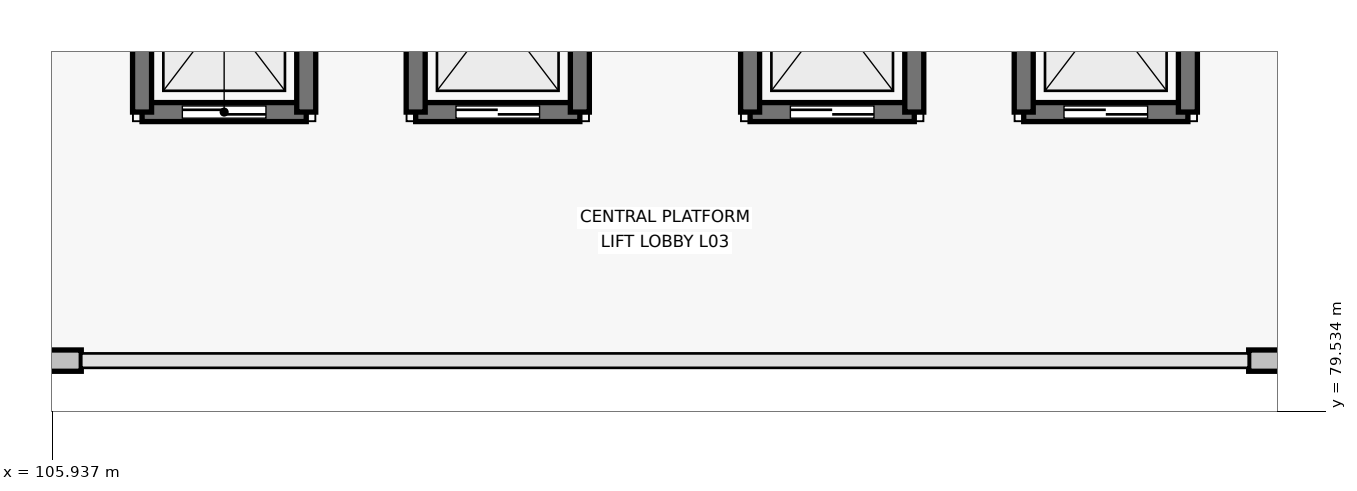
"""IFC4 building model, lengths in metres.
Left out: names, types, materials, properties, quantities, classifications, styles, units other than length and angle.
Written with IfcOpenShell. Run it as: python <this file> out.ifc"""

import sys

from ifc_helpers import new_model, si_unit, direction, frame, frame_2d, origin, place, context, subcontext, project, spatial, rectangle, extrude, element, fill, save


model = new_model("IFC4")
c1 = context("Model", 3, precision=1e-05, world=origin(), true_north=direction((0.0, 1.0)))
c2 = subcontext(c1, "Body", "Model", "MODEL_VIEW")
j1 = project(units=[si_unit("LENGTHUNIT", "METRE"), si_unit("PLANEANGLEUNIT", "RADIAN")], contexts=[c1])
p1 = place(None, origin())
s1 = spatial("IfcSite", under=j1, at=p1, CompositionType="ELEMENT")
p2 = place(p1, origin())
s2 = spatial("IfcBuilding", under=s1, at=p2, CompositionType="ELEMENT")
p3 = place(p2, frame((0.0, 0.0, 16.8)))
s3 = spatial("IfcBuildingStorey", under=s2, at=p3, CompositionType="ELEMENT", Elevation=16.8)
for number, where, z_axis, x_axis in (
    (1, (105.6, 80.2, 0.0), (0.0, 0.0, 1.0), (1.0, 0.0, 0.0)),
    (2, (121.68, 80.2, 0.0), (0.0, 0.0, 1.0), (1.0, 0.0, 0.0)),
):
    element("IfcWall", number, at=place(p3, frame(where, z_axis=z_axis, x_axis=x_axis)), inside=s3, PredefinedType="STANDARD", context=c2, shape_type="SweptSolid", body=[
        extrude(rectangle(XDim=0.72, YDim=0.28, at=frame_2d((0.36, 0.0))), origin(), (0.0, 0.0, 1.0), 3.45),
    ])
p4 = place(p3, frame((107.12, 83.47, 0.0), z_axis=(0.0, 0.0, 1.0), x_axis=(1.0, 0.0, 0.0)))
e3 = element("IfcWall", 3, at=p4, inside=s3, PredefinedType="SHEAR", context=c2, shape_type="SweptSolid", body=[
    extrude(rectangle(XDim=2.16, YDim=0.25, at=frame_2d((1.08, 0.0))), origin(), (0.0, 0.0, 1.0), 3.675),
])
p5 = place(p4, frame((0.53, 0.0, 0.0)))
e4 = element("IfcOpeningElement", 4, at=p5, cuts=e3, PredefinedType="OPENING", context=c2, shape_type="SweptSolid", body=[
    extrude(rectangle(XDim=1.1, YDim=2.2, at=frame_2d((0.55, 1.1))), frame((0.0, 0.135, 0.0), z_axis=(0.0, -1.0, 0.0), x_axis=(1.0, 0.0, 0.0)), (0.0, 0.0, 1.0), 0.27),
])
for number, where, z_axis, x_axis in (
    (5, (109.28, 83.47, 0.0), (0.0, 0.0, 1.0), (0.0, 1.0, 0.0)),
    (6, (107.12, 86.13, 0.0), (0.0, 0.0, 1.0), (0.0, -1.0, 0.0)),
):
    element("IfcWall", number, at=place(p3, frame(where, z_axis=z_axis, x_axis=x_axis)), inside=s3, PredefinedType="SHEAR", context=c2, shape_type="SweptSolid", body=[
        extrude(rectangle(XDim=2.66, YDim=0.25, at=frame_2d((1.33, 0.0))), origin(), (0.0, 0.0, 1.0), 3.675),
    ])
p6 = place(p3, frame((110.72, 83.47, 0.0), z_axis=(0.0, 0.0, 1.0), x_axis=(1.0, 0.0, 0.0)))
e7 = element("IfcWall", 7, at=p6, inside=s3, PredefinedType="SHEAR", context=c2, shape_type="SweptSolid", body=[
    extrude(rectangle(XDim=2.16, YDim=0.25, at=frame_2d((1.08, 0.0))), origin(), (0.0, 0.0, 1.0), 3.675),
])
p7 = place(p6, frame((0.53, 0.0, 0.0)))
e8 = element("IfcOpeningElement", 8, at=p7, cuts=e7, PredefinedType="OPENING", context=c2, shape_type="SweptSolid", body=[
    extrude(rectangle(XDim=1.1, YDim=2.2, at=frame_2d((0.55, 1.1))), frame((0.0, 0.135, 0.0), z_axis=(0.0, -1.0, 0.0), x_axis=(1.0, 0.0, 0.0)), (0.0, 0.0, 1.0), 0.27),
])
for number, where, z_axis, x_axis in (
    (9, (112.88, 83.47, 0.0), (0.0, 0.0, 1.0), (0.0, 1.0, 0.0)),
    (10, (110.72, 86.13, 0.0), (0.0, 0.0, 1.0), (0.0, -1.0, 0.0)),
):
    element("IfcWall", number, at=place(p3, frame(where, z_axis=z_axis, x_axis=x_axis)), inside=s3, PredefinedType="SHEAR", context=c2, shape_type="SweptSolid", body=[
        extrude(rectangle(XDim=2.66, YDim=0.25, at=frame_2d((1.33, 0.0))), origin(), (0.0, 0.0, 1.0), 3.675),
    ])
p8 = place(p3, frame((115.12, 83.47, 0.0), z_axis=(0.0, 0.0, 1.0), x_axis=(1.0, 0.0, 0.0)))
e11 = element("IfcWall", 11, at=p8, inside=s3, PredefinedType="SHEAR", context=c2, shape_type="SweptSolid", body=[
    extrude(rectangle(XDim=2.16, YDim=0.25, at=frame_2d((1.08, 0.0))), origin(), (0.0, 0.0, 1.0), 3.675),
])
p9 = place(p8, frame((0.53, 0.0, 0.0)))
e12 = element("IfcOpeningElement", 12, at=p9, cuts=e11, PredefinedType="OPENING", context=c2, shape_type="SweptSolid", body=[
    extrude(rectangle(XDim=1.1, YDim=2.2, at=frame_2d((0.55, 1.1))), frame((0.0, 0.135, 0.0), z_axis=(0.0, -1.0, 0.0), x_axis=(1.0, 0.0, 0.0)), (0.0, 0.0, 1.0), 0.27),
])
for number, where, z_axis, x_axis in (
    (13, (117.28, 83.47, 0.0), (0.0, 0.0, 1.0), (0.0, 1.0, 0.0)),
    (14, (115.12, 86.13, 0.0), (0.0, 0.0, 1.0), (0.0, -1.0, 0.0)),
):
    element("IfcWall", number, at=place(p3, frame(where, z_axis=z_axis, x_axis=x_axis)), inside=s3, PredefinedType="SHEAR", context=c2, shape_type="SweptSolid", body=[
        extrude(rectangle(XDim=2.66, YDim=0.25, at=frame_2d((1.33, 0.0))), origin(), (0.0, 0.0, 1.0), 3.675),
    ])
p10 = place(p3, frame((118.72, 83.47, 0.0), z_axis=(0.0, 0.0, 1.0), x_axis=(1.0, 0.0, 0.0)))
e15 = element("IfcWall", 15, at=p10, inside=s3, PredefinedType="SHEAR", context=c2, shape_type="SweptSolid", body=[
    extrude(rectangle(XDim=2.16, YDim=0.25, at=frame_2d((1.08, 0.0))), origin(), (0.0, 0.0, 1.0), 3.675),
])
p11 = place(p10, frame((0.53, 0.0, 0.0)))
e16 = element("IfcOpeningElement", 16, at=p11, cuts=e15, PredefinedType="OPENING", context=c2, shape_type="SweptSolid", body=[
    extrude(rectangle(XDim=1.1, YDim=2.2, at=frame_2d((0.55, 1.1))), frame((0.0, 0.135, 0.0), z_axis=(0.0, -1.0, 0.0), x_axis=(1.0, 0.0, 0.0)), (0.0, 0.0, 1.0), 0.27),
])
for number, where, z_axis, x_axis in (
    (17, (120.88, 83.47, 0.0), (0.0, 0.0, 1.0), (0.0, 1.0, 0.0)),
    (18, (118.72, 86.13, 0.0), (0.0, 0.0, 1.0), (0.0, -1.0, 0.0)),
):
    element("IfcWall", number, at=place(p3, frame(where, z_axis=z_axis, x_axis=x_axis)), inside=s3, PredefinedType="SHEAR", context=c2, shape_type="SweptSolid", body=[
        extrude(rectangle(XDim=2.66, YDim=0.25, at=frame_2d((1.33, 0.0))), origin(), (0.0, 0.0, 1.0), 3.675),
    ])
p12 = place(p5, origin())
e19 = element("IfcDoor", 19, at=p12, inside=s3, OperationType="SLIDING_TO_LEFT", PredefinedType="DOOR", context=c2, shape_type="SweptSolid", body=[
    extrude(rectangle(XDim=1.1, YDim=2.2, at=frame_2d((0.55, 1.1))), frame((0.0, 0.025, 0.0), z_axis=(0.0, -1.0, 0.0), x_axis=(1.0, 0.0, 0.0)), (0.0, 0.0, 1.0), 0.05),
])
fill(e4, e19)
p13 = place(p7, origin())
e20 = element("IfcDoor", 20, at=p13, inside=s3, OperationType="SLIDING_TO_LEFT", PredefinedType="DOOR", context=c2, shape_type="SweptSolid", body=[
    extrude(rectangle(XDim=1.1, YDim=2.2, at=frame_2d((0.55, 1.1))), frame((0.0, 0.025, 0.0), z_axis=(0.0, -1.0, 0.0), x_axis=(1.0, 0.0, 0.0)), (0.0, 0.0, 1.0), 0.05),
])
fill(e8, e20)
p14 = place(p9, origin())
e21 = element("IfcDoor", 21, at=p14, inside=s3, OperationType="SLIDING_TO_LEFT", PredefinedType="DOOR", context=c2, shape_type="SweptSolid", body=[
    extrude(rectangle(XDim=1.1, YDim=2.2, at=frame_2d((0.55, 1.1))), frame((0.0, 0.025, 0.0), z_axis=(0.0, -1.0, 0.0), x_axis=(1.0, 0.0, 0.0)), (0.0, 0.0, 1.0), 0.05),
])
fill(e12, e21)
p15 = place(p11, origin())
e22 = element("IfcDoor", 22, at=p15, inside=s3, OperationType="SLIDING_TO_LEFT", PredefinedType="DOOR", context=c2, shape_type="SweptSolid", body=[
    extrude(rectangle(XDim=1.1, YDim=2.2, at=frame_2d((0.55, 1.1))), frame((0.0, 0.025, 0.0), z_axis=(0.0, -1.0, 0.0), x_axis=(1.0, 0.0, 0.0)), (0.0, 0.0, 1.0), 0.05),
])
fill(e16, e22)
save(model, sys.argv[1])
